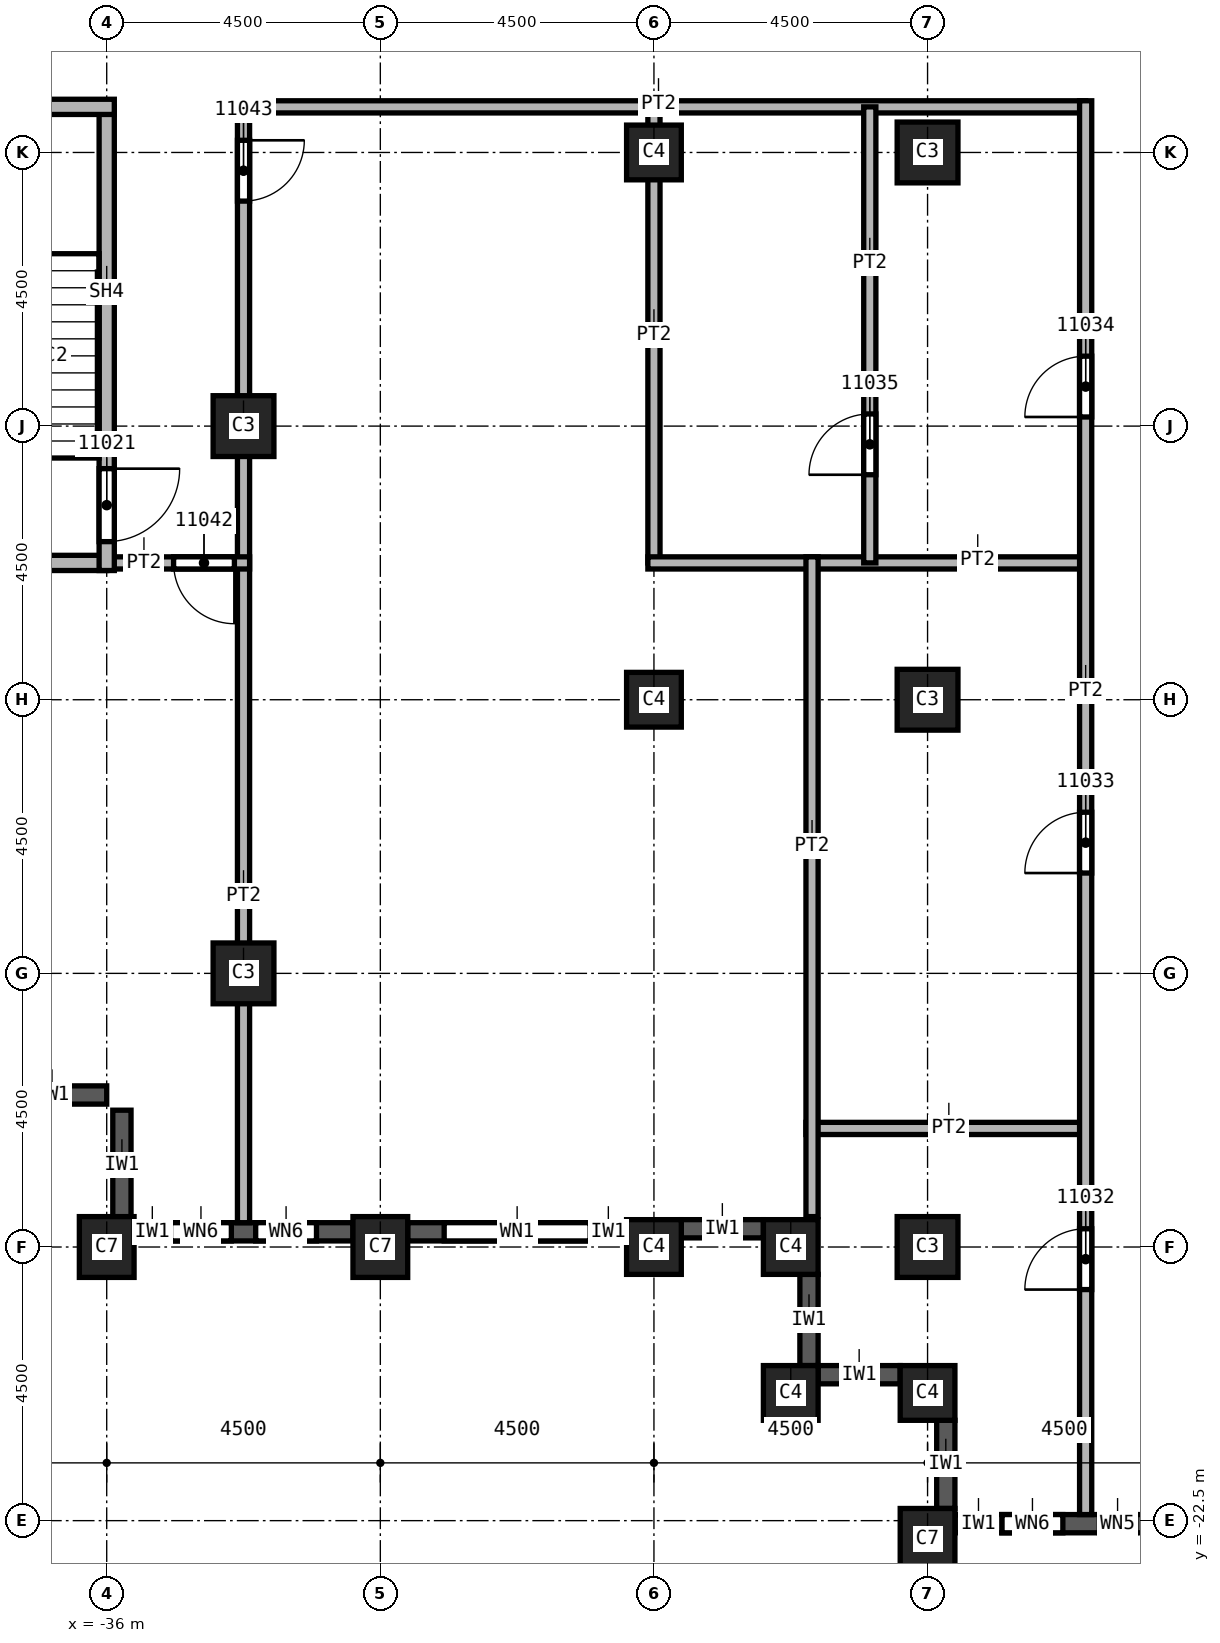
"""IFC4 building model, lengths in metres.
Left out: names, types, materials, properties, quantities, classifications, styles, units other than length and angle.
Written with IfcOpenShell. Run it as: python <this file> out.ifc"""

import sys

from ifc_helpers import new_model, si_unit, direction, frame, frame_2d, origin, origin_2d, place, context, subcontext, project, spatial, rectangle, extrude, element, fill, save


model = new_model("IFC4")
c1 = context("Model", 3, precision=1e-05, world=origin(), true_north=direction((0.0, 1.0)))
c2 = subcontext(c1, "Body", "Model", "MODEL_VIEW")
j1 = project(units=[si_unit("LENGTHUNIT", "METRE"), si_unit("PLANEANGLEUNIT", "RADIAN")], contexts=[c1])
p1 = place(None, origin())
s1 = spatial("IfcSite", under=j1, at=p1, CompositionType="ELEMENT")
p2 = place(p1, origin())
s2 = spatial("IfcBuilding", under=s1, at=p2, CompositionType="ELEMENT")
p3 = place(p2, frame((0.0, 0.0, 184.0)))
s3 = spatial("IfcBuildingStorey", under=s2, at=p3, CompositionType="ELEMENT", Elevation=184.0)
for number, where, z_axis, x_axis in (
    (1, (-31.5, -18.0, 0.0), (0.0, 0.0, 1.0), (1.0, 0.0, 0.0)),
    (2, (-36.0, -18.0, 0.0), (0.0, 0.0, 1.0), (1.0, 0.0, 0.0)),
):
    element("IfcColumn", number, at=place(p3, frame(where, z_axis=z_axis, x_axis=x_axis)), inside=s3, PredefinedType="COLUMN", context=c2, shape_type="SweptSolid", body=[
        extrude(rectangle(XDim=0.9, YDim=1.0, at=origin_2d()), origin(), (0.0, 0.0, 1.0), 3.72),
    ])
for number, where, z_axis, x_axis in (
    (3, (-33.75, -4.5, 0.0), (0.0, 0.0, 1.0), (1.0, 0.0, 0.0)),
    (4, (-33.75, -13.5, 0.0), (0.0, 0.0, 1.0), (1.0, 0.0, 0.0)),
    (5, (-22.5, 0.0, 0.0), (0.0, 0.0, 1.0), (1.0, 0.0, 0.0)),
    (6, (-22.5, -9.0, 0.0), (0.0, 0.0, 1.0), (1.0, 0.0, 0.0)),
    (7, (-22.5, -18.0, 0.0), (0.0, 0.0, 1.0), (1.0, 0.0, 0.0)),
):
    element("IfcColumn", number, at=place(p3, frame(where, z_axis=z_axis, x_axis=x_axis)), inside=s3, PredefinedType="COLUMN", context=c2, shape_type="SweptSolid", body=[
        extrude(rectangle(XDim=1.0, YDim=1.0, at=origin_2d()), origin(), (0.0, 0.0, 1.0), 3.72),
    ])
p4 = place(p3, frame((-22.5, -22.8, 0.0), z_axis=(0.0, 0.0, 1.0), x_axis=(1.0, 0.0, 0.0)))
e8 = element("IfcColumn", 8, at=p4, inside=s3, PredefinedType="COLUMN", context=c2, shape_type="SweptSolid", body=[
    extrude(rectangle(XDim=0.9, YDim=1.0, at=origin_2d()), origin(), (0.0, 0.0, 1.0), 3.72),
])
for number, where, z_axis, x_axis in (
    (9, (-27.0, 0.0, 0.0), (0.0, 0.0, 1.0), (1.0, 0.0, 0.0)),
    (10, (-27.0, -9.0, 0.0), (0.0, 0.0, 1.0), (1.0, 0.0, 0.0)),
    (11, (-27.0, -18.0, 0.0), (0.0, 0.0, 1.0), (1.0, 0.0, 0.0)),
    (12, (-22.5, -20.4, 0.0), (0.0, 0.0, 1.0), (1.0, 0.0, 0.0)),
    (13, (-24.75, -20.4, 0.0), (0.0, 0.0, 1.0), (1.0, 0.0, 0.0)),
    (14, (-24.75, -18.0, 0.0), (0.0, 0.0, 1.0), (1.0, 0.0, 0.0)),
):
    element("IfcColumn", number, at=place(p3, frame(where, z_axis=z_axis, x_axis=x_axis)), inside=s3, PredefinedType="COLUMN", context=c2, shape_type="SweptSolid", body=[
        extrude(rectangle(XDim=0.9, YDim=0.9, at=origin_2d()), origin(), (0.0, 0.0, 1.0), 3.72),
    ])
for number, where, z_axis, x_axis in (
    (15, (-37.8, -15.5, 0.0), (0.0, 0.0, 1.0), (1.0, 0.0, 0.0)),
    (16, (-35.75, -17.55, 0.0), (0.0, 0.0, 1.0), (0.0, 1.0, 0.0)),
):
    element("IfcWall", number, at=place(p3, frame(where, z_axis=z_axis, x_axis=x_axis)), inside=s3, PredefinedType="SOLIDWALL", context=c2, shape_type="SweptSolid", body=[
        extrude(rectangle(XDim=1.8, YDim=0.3, at=frame_2d((0.9, 0.0))), origin(), (0.0, 0.0, 1.0), 3.12),
    ])
p5 = place(p3, frame((-35.55, -17.75, 0.0), z_axis=(0.0, 0.0, 1.0), x_axis=(1.0, 0.0, 0.0)))
e17 = element("IfcWall", 17, at=p5, inside=s3, PredefinedType="SOLIDWALL", context=c2, shape_type="SweptSolid", body=[
    extrude(rectangle(XDim=3.6, YDim=0.3, at=frame_2d((1.8, 0.0))), origin(), (0.0, 0.0, 1.0), 3.12),
])
p6 = place(p5, frame((0.6, 0.0, 0.8)))
e18 = element("IfcOpeningElement", 18, at=p6, cuts=e17, PredefinedType="OPENING", context=c2, shape_type="SweptSolid", body=[
    extrude(rectangle(XDim=1.0, YDim=1.95, at=frame_2d((0.5, 0.975))), frame((0.0, 0.15, 0.0), z_axis=(0.0, -1.0, 0.0), x_axis=(1.0, 0.0, 0.0)), (0.0, 0.0, 1.0), 0.3),
])
p7 = place(p5, frame((2.0, 0.0, 0.8)))
e19 = element("IfcOpeningElement", 19, at=p7, cuts=e17, PredefinedType="OPENING", context=c2, shape_type="SweptSolid", body=[
    extrude(rectangle(XDim=1.0, YDim=1.95, at=frame_2d((0.5, 0.975))), frame((0.0, 0.15, 0.0), z_axis=(0.0, -1.0, 0.0), x_axis=(1.0, 0.0, 0.0)), (0.0, 0.0, 1.0), 0.3),
])
p8 = place(p3, frame((-31.05, -17.75, 0.0), z_axis=(0.0, 0.0, 1.0), x_axis=(1.0, 0.0, 0.0)))
e20 = element("IfcWall", 20, at=p8, inside=s3, PredefinedType="SOLIDWALL", context=c2, shape_type="SweptSolid", body=[
    extrude(rectangle(XDim=3.6, YDim=0.3, at=frame_2d((1.8, 0.0))), origin(), (0.0, 0.0, 1.0), 3.12),
])
p9 = place(p8, frame((0.6, 0.0, 0.8)))
e21 = element("IfcOpeningElement", 21, at=p9, cuts=e20, PredefinedType="OPENING", context=c2, shape_type="SweptSolid", body=[
    extrude(rectangle(XDim=2.4, YDim=1.95, at=frame_2d((1.2, 0.975))), frame((0.0, 0.15, 0.0), z_axis=(0.0, -1.0, 0.0), x_axis=(1.0, 0.0, 0.0)), (0.0, 0.0, 1.0), 0.3),
])
p10 = place(p3, frame((-26.55, -17.7, 0.0), z_axis=(0.0, 0.0, 1.0), x_axis=(1.0, 0.0, 0.0)))
e22 = element("IfcWall", 22, at=p10, inside=s3, PredefinedType="SOLIDWALL", context=c2, shape_type="SweptSolid", body=[
    extrude(rectangle(XDim=1.35, YDim=0.3, at=frame_2d((0.675, 0.0))), origin(), (0.0, 0.0, 1.0), 3.12),
])
p11 = place(p3, frame((-24.45, -18.45, 0.0), z_axis=(0.0, 0.0, 1.0), x_axis=(0.0, -1.0, 0.0)))
e23 = element("IfcWall", 23, at=p11, inside=s3, PredefinedType="SOLIDWALL", context=c2, shape_type="SweptSolid", body=[
    extrude(rectangle(XDim=1.5, YDim=0.3, at=frame_2d((0.75, 0.0))), origin(), (0.0, 0.0, 1.0), 3.12),
])
p12 = place(p3, frame((-24.3, -20.1, 0.0), z_axis=(0.0, 0.0, 1.0), x_axis=(1.0, 0.0, 0.0)))
e24 = element("IfcWall", 24, at=p12, inside=s3, PredefinedType="SOLIDWALL", context=c2, shape_type="SweptSolid", body=[
    extrude(rectangle(XDim=1.35, YDim=0.3, at=frame_2d((0.675, 0.0))), origin(), (0.0, 0.0, 1.0), 3.12),
])
p13 = place(p3, frame((-22.2, -20.85, 0.0), z_axis=(0.0, 0.0, 1.0), x_axis=(0.0, -1.0, 0.0)))
e25 = element("IfcWall", 25, at=p13, inside=s3, PredefinedType="SOLIDWALL", context=c2, shape_type="SweptSolid", body=[
    extrude(rectangle(XDim=1.45, YDim=0.3, at=frame_2d((0.725, 0.0))), origin(), (0.0, 0.0, 1.0), 3.12),
])
p14 = place(p3, frame((-22.05, -22.55, 0.0), z_axis=(0.0, 0.0, 1.0), x_axis=(1.0, 0.0, 0.0)))
e26 = element("IfcWall", 26, at=p14, inside=s3, PredefinedType="SOLIDWALL", context=c2, shape_type="SweptSolid", body=[
    extrude(rectangle(XDim=3.6, YDim=0.3, at=frame_2d((1.8, 0.0))), origin(), (0.0, 0.0, 1.0), 3.12),
])
p15 = place(p14, frame((0.775, 0.0, 0.8)))
e27 = element("IfcOpeningElement", 27, at=p15, cuts=e26, PredefinedType="OPENING", context=c2, shape_type="SweptSolid", body=[
    extrude(rectangle(XDim=1.0, YDim=1.95, at=frame_2d((0.5, 0.975))), frame((0.0, 0.15, 0.0), z_axis=(0.0, -1.0, 0.0), x_axis=(1.0, 0.0, 0.0)), (0.0, 0.0, 1.0), 0.3),
])
p16 = place(p14, frame((2.375, 0.0, 0.8)))
e28 = element("IfcOpeningElement", 28, at=p16, cuts=e26, PredefinedType="OPENING", context=c2, shape_type="SweptSolid", body=[
    extrude(rectangle(XDim=0.6, YDim=1.95, at=frame_2d((0.3, 0.975))), frame((0.0, 0.15, 0.0), z_axis=(0.0, -1.0, 0.0), x_axis=(1.0, 0.0, 0.0)), (0.0, 0.0, 1.0), 0.3),
])
p17 = place(p3, frame((-33.75, 0.75, 0.0), z_axis=(0.0, 0.0, 1.0), x_axis=(0.0, -1.0, 0.0)))
e29 = element("IfcWall", 29, at=p17, inside=s3, PredefinedType="PARTITIONING", context=c2, shape_type="SweptSolid", body=[
    extrude(rectangle(XDim=18.35, YDim=0.2, at=frame_2d((9.175, 0.0))), origin(), (0.0, 0.0, 1.0), 3.72),
])
p18 = place(p17, frame((0.55, 0.0, 0.0)))
e30 = element("IfcOpeningElement", 30, at=p18, cuts=e29, PredefinedType="OPENING", context=c2, shape_type="SweptSolid", body=[
    extrude(rectangle(XDim=1.0, YDim=2.1, at=frame_2d((0.5, 1.05))), frame((0.0, 0.1, 0.0), z_axis=(0.0, -1.0, 0.0), x_axis=(1.0, 0.0, 0.0)), (0.0, 0.0, 1.0), 0.2),
])
p19 = place(p3, frame((-33.65, -6.75, 0.0), z_axis=(0.0, 0.0, 1.0), x_axis=(-1.0, 0.0, 0.0)))
e31 = element("IfcWall", 31, at=p19, inside=s3, PredefinedType="PARTITIONING", context=c2, shape_type="SweptSolid", body=[
    extrude(rectangle(XDim=2.35, YDim=0.2, at=frame_2d((1.175, 0.0))), origin(), (0.0, 0.0, 1.0), 3.72),
])
p20 = place(p19, frame((0.25, 0.0, 0.0)))
e32 = element("IfcOpeningElement", 32, at=p20, cuts=e31, PredefinedType="OPENING", context=c2, shape_type="SweptSolid", body=[
    extrude(rectangle(XDim=1.0, YDim=2.1, at=frame_2d((0.5, 1.05))), frame((0.0, 0.1, 0.0), z_axis=(0.0, -1.0, 0.0), x_axis=(1.0, 0.0, 0.0)), (0.0, 0.0, 1.0), 0.2),
])
p21 = place(p3, frame((-27.0, -6.75, 0.0), z_axis=(0.0, 0.0, 1.0), x_axis=(0.0, 1.0, 0.0)))
e33 = element("IfcWall", 33, at=p21, inside=s3, PredefinedType="PARTITIONING", context=c2, shape_type="SweptSolid", body=[
    extrude(rectangle(XDim=7.5, YDim=0.2, at=frame_2d((3.75, 0.0))), origin(), (0.0, 0.0, 1.0), 3.72),
])
p22 = place(p3, frame((-19.9, 0.75, 0.0), z_axis=(0.0, 0.0, 1.0), x_axis=(-1.0, 0.0, 0.0)))
e34 = element("IfcWall", 34, at=p22, inside=s3, PredefinedType="PARTITIONING", context=c2, shape_type="SweptSolid", body=[
    extrude(rectangle(XDim=13.95, YDim=0.2, at=frame_2d((6.975, 0.0))), origin(), (0.0, 0.0, 1.0), 3.72),
])
p23 = place(p3, frame((-24.5, -16.05, 0.0), z_axis=(0.0, 0.0, 1.0), x_axis=(1.0, 0.0, 0.0)))
e35 = element("IfcWall", 35, at=p23, inside=s3, PredefinedType="PARTITIONING", context=c2, shape_type="SweptSolid", body=[
    extrude(rectangle(XDim=4.6, YDim=0.2, at=frame_2d((2.3, 0.0))), origin(), (0.0, 0.0, 1.0), 3.72),
])
p24 = place(p3, frame((-27.1, -6.75, 0.0), z_axis=(0.0, 0.0, 1.0), x_axis=(1.0, 0.0, 0.0)))
e36 = element("IfcWall", 36, at=p24, inside=s3, PredefinedType="PARTITIONING", context=c2, shape_type="SweptSolid", body=[
    extrude(rectangle(XDim=7.2, YDim=0.2, at=frame_2d((3.6, 0.0))), origin(), (0.0, 0.0, 1.0), 3.72),
])
p25 = place(p3, frame((-24.4, -17.5, 0.0), z_axis=(0.0, 0.0, 1.0), x_axis=(0.0, 1.0, 0.0)))
e37 = element("IfcWall", 37, at=p25, inside=s3, PredefinedType="PARTITIONING", context=c2, shape_type="SweptSolid", body=[
    extrude(rectangle(XDim=10.85, YDim=0.2, at=frame_2d((5.425, 0.0))), origin(), (0.0, 0.0, 1.0), 3.72),
])
p26 = place(p3, frame((-23.45, -6.75, 0.0), z_axis=(0.0, 0.0, 1.0), x_axis=(0.0, 1.0, 0.0)))
e38 = element("IfcWall", 38, at=p26, inside=s3, PredefinedType="PARTITIONING", context=c2, shape_type="SweptSolid", body=[
    extrude(rectangle(XDim=7.5, YDim=0.2, at=frame_2d((3.75, 0.0))), origin(), (0.0, 0.0, 1.0), 3.72),
])
p27 = place(p26, frame((1.45, 0.0, 0.0)))
e39 = element("IfcOpeningElement", 39, at=p27, cuts=e38, PredefinedType="OPENING", context=c2, shape_type="SweptSolid", body=[
    extrude(rectangle(XDim=1.0, YDim=2.1, at=frame_2d((0.5, 1.05))), frame((0.0, 0.1, 0.0), z_axis=(0.0, -1.0, 0.0), x_axis=(1.0, 0.0, 0.0)), (0.0, 0.0, 1.0), 0.2),
])
p28 = place(p3, frame((-19.9, -22.4, 0.0), z_axis=(0.0, 0.0, 1.0), x_axis=(0.0, 1.0, 0.0)))
e40 = element("IfcWall", 40, at=p28, inside=s3, PredefinedType="PARTITIONING", context=c2, shape_type="SweptSolid", body=[
    extrude(rectangle(XDim=23.25, YDim=0.2, at=frame_2d((11.625, 0.0))), origin(), (0.0, 0.0, 1.0), 3.72),
])
p29 = place(p28, frame((3.7, 0.0, 0.0)))
e41 = element("IfcOpeningElement", 41, at=p29, cuts=e40, PredefinedType="OPENING", context=c2, shape_type="SweptSolid", body=[
    extrude(rectangle(XDim=1.0, YDim=2.1, at=frame_2d((0.5, 1.05))), frame((0.0, 0.1, 0.0), z_axis=(0.0, -1.0, 0.0), x_axis=(1.0, 0.0, 0.0)), (0.0, 0.0, 1.0), 0.2),
])
p30 = place(p28, frame((10.55, 0.0, 0.0)))
e42 = element("IfcOpeningElement", 42, at=p30, cuts=e40, PredefinedType="OPENING", context=c2, shape_type="SweptSolid", body=[
    extrude(rectangle(XDim=1.0, YDim=2.1, at=frame_2d((0.5, 1.05))), frame((0.0, 0.1, 0.0), z_axis=(0.0, -1.0, 0.0), x_axis=(1.0, 0.0, 0.0)), (0.0, 0.0, 1.0), 0.2),
])
p31 = place(p28, frame((18.05, 0.0, 0.0)))
e43 = element("IfcOpeningElement", 43, at=p31, cuts=e40, PredefinedType="OPENING", context=c2, shape_type="SweptSolid", body=[
    extrude(rectangle(XDim=1.0, YDim=2.1, at=frame_2d((0.5, 1.05))), frame((0.0, 0.1, 0.0), z_axis=(0.0, -1.0, 0.0), x_axis=(1.0, 0.0, 0.0)), (0.0, 0.0, 1.0), 0.2),
])
p32 = place(p3, frame((-36.0, -6.75, 0.0), z_axis=(0.0, 0.0, 1.0), x_axis=(-1.0, 0.0, 0.0)))
e44 = element("IfcWall", 44, at=p32, inside=s3, PredefinedType="SOLIDWALL", context=c2, shape_type="SweptSolid", body=[
    extrude(rectangle(XDim=4.1, YDim=0.25, at=frame_2d((2.05, 0.0))), origin(), (0.0, 0.0, 1.0), 3.72),
])
p33 = place(p3, frame((-36.0, 0.75, 0.0), z_axis=(0.0, 0.0, 1.0), x_axis=(0.0, -1.0, 0.0)))
e45 = element("IfcWall", 45, at=p33, inside=s3, PredefinedType="SOLIDWALL", context=c2, shape_type="SweptSolid", body=[
    extrude(rectangle(XDim=7.625, YDim=0.25, at=frame_2d((3.812, 0.0))), origin(), (0.0, 0.0, 1.0), 3.72),
])
p34 = place(p33, frame((5.95, 0.0, 0.0)))
e46 = element("IfcOpeningElement", 46, at=p34, cuts=e45, PredefinedType="OPENING", context=c2, shape_type="SweptSolid", body=[
    extrude(rectangle(XDim=1.2, YDim=2.1, at=frame_2d((0.6, 1.05))), frame((0.0, 0.125, 0.0), z_axis=(0.0, -1.0, 0.0), x_axis=(1.0, 0.0, 0.0)), (0.0, 0.0, 1.0), 0.25),
])
p35 = place(p3, frame((-35.875, 0.75, 0.0), z_axis=(0.0, 0.0, 1.0), x_axis=(-1.0, 0.0, 0.0)))
e47 = element("IfcWall", 47, at=p35, inside=s3, PredefinedType="SOLIDWALL", context=c2, shape_type="SweptSolid", body=[
    extrude(rectangle(XDim=4.225, YDim=0.25, at=frame_2d((2.113, 0.0))), origin(), (0.0, 0.0, 1.0), 3.72),
])
p36 = place(p9, origin())
e48 = element("IfcWindow", 48, at=p36, inside=s3, PartitioningType="SINGLE_PANEL", PredefinedType="WINDOW", context=c2, shape_type="SweptSolid", body=[
    extrude(rectangle(XDim=2.4, YDim=1.95, at=frame_2d((1.2, 0.975))), frame((0.0, 0.03, 0.0), z_axis=(0.0, -1.0, 0.0), x_axis=(1.0, 0.0, 0.0)), (0.0, 0.0, 1.0), 0.06),
])
fill(e21, e48)
p37 = place(p34, origin())
e49 = element("IfcDoor", 49, at=p37, inside=s3, OperationType="SINGLE_SWING_RIGHT", PredefinedType="DOOR", context=c2, shape_type="SweptSolid", body=[
    extrude(rectangle(XDim=1.2, YDim=2.1, at=frame_2d((0.6, 1.05))), frame((0.0, 0.025, 0.0), z_axis=(0.0, -1.0, 0.0), x_axis=(1.0, 0.0, 0.0)), (0.0, 0.0, 1.0), 0.05),
])
fill(e46, e49)
p38 = place(p29, origin())
e50 = element("IfcDoor", 50, at=p38, inside=s3, OperationType="SINGLE_SWING_LEFT", PredefinedType="DOOR", context=c2, shape_type="SweptSolid", body=[
    extrude(rectangle(XDim=1.0, YDim=2.1, at=frame_2d((0.5, 1.05))), frame((0.0, 0.025, 0.0), z_axis=(0.0, -1.0, 0.0), x_axis=(1.0, 0.0, 0.0)), (0.0, 0.0, 1.0), 0.05),
])
fill(e41, e50)
p39 = place(p30, origin())
e51 = element("IfcDoor", 51, at=p39, inside=s3, OperationType="SINGLE_SWING_RIGHT", PredefinedType="DOOR", context=c2, shape_type="SweptSolid", body=[
    extrude(rectangle(XDim=1.0, YDim=2.1, at=frame_2d((0.5, 1.05))), frame((0.0, 0.025, 0.0), z_axis=(0.0, -1.0, 0.0), x_axis=(1.0, 0.0, 0.0)), (0.0, 0.0, 1.0), 0.05),
])
fill(e42, e51)
p40 = place(p31, origin())
e52 = element("IfcDoor", 52, at=p40, inside=s3, OperationType="SINGLE_SWING_LEFT", PredefinedType="DOOR", context=c2, shape_type="SweptSolid", body=[
    extrude(rectangle(XDim=1.0, YDim=2.1, at=frame_2d((0.5, 1.05))), frame((0.0, 0.025, 0.0), z_axis=(0.0, -1.0, 0.0), x_axis=(1.0, 0.0, 0.0)), (0.0, 0.0, 1.0), 0.05),
])
fill(e43, e52)
p41 = place(p27, origin())
e53 = element("IfcDoor", 53, at=p41, inside=s3, OperationType="SINGLE_SWING_RIGHT", PredefinedType="DOOR", context=c2, shape_type="SweptSolid", body=[
    extrude(rectangle(XDim=1.0, YDim=2.1, at=frame_2d((0.5, 1.05))), frame((0.0, 0.025, 0.0), z_axis=(0.0, -1.0, 0.0), x_axis=(1.0, 0.0, 0.0)), (0.0, 0.0, 1.0), 0.05),
])
fill(e39, e53)
p42 = place(p20, origin())
e54 = element("IfcDoor", 54, at=p42, inside=s3, OperationType="SINGLE_SWING_LEFT", PredefinedType="DOOR", context=c2, shape_type="SweptSolid", body=[
    extrude(rectangle(XDim=1.0, YDim=2.1, at=frame_2d((0.5, 1.05))), frame((0.0, 0.025, 0.0), z_axis=(0.0, -1.0, 0.0), x_axis=(1.0, 0.0, 0.0)), (0.0, 0.0, 1.0), 0.05),
])
fill(e32, e54)
p43 = place(p18, origin())
e55 = element("IfcDoor", 55, at=p43, inside=s3, OperationType="SINGLE_SWING_RIGHT", PredefinedType="DOOR", context=c2, shape_type="SweptSolid", body=[
    extrude(rectangle(XDim=1.0, YDim=2.1, at=frame_2d((0.5, 1.05))), frame((0.0, 0.025, 0.0), z_axis=(0.0, -1.0, 0.0), x_axis=(1.0, 0.0, 0.0)), (0.0, 0.0, 1.0), 0.05),
])
fill(e30, e55)
p44 = place(p6, origin())
e56 = element("IfcWindow", 56, at=p44, inside=s3, PartitioningType="SINGLE_PANEL", PredefinedType="WINDOW", context=c2, shape_type="SweptSolid", body=[
    extrude(rectangle(XDim=1.0, YDim=1.95, at=frame_2d((0.5, 0.975))), frame((0.0, 0.03, 0.0), z_axis=(0.0, -1.0, 0.0), x_axis=(1.0, 0.0, 0.0)), (0.0, 0.0, 1.0), 0.06),
])
fill(e18, e56)
p45 = place(p7, origin())
e57 = element("IfcWindow", 57, at=p45, inside=s3, PartitioningType="SINGLE_PANEL", PredefinedType="WINDOW", context=c2, shape_type="SweptSolid", body=[
    extrude(rectangle(XDim=1.0, YDim=1.95, at=frame_2d((0.5, 0.975))), frame((0.0, 0.03, 0.0), z_axis=(0.0, -1.0, 0.0), x_axis=(1.0, 0.0, 0.0)), (0.0, 0.0, 1.0), 0.06),
])
fill(e19, e57)
p46 = place(p15, origin())
e58 = element("IfcWindow", 58, at=p46, inside=s3, PartitioningType="SINGLE_PANEL", PredefinedType="WINDOW", context=c2, shape_type="SweptSolid", body=[
    extrude(rectangle(XDim=1.0, YDim=1.95, at=frame_2d((0.5, 0.975))), frame((0.0, 0.03, 0.0), z_axis=(0.0, -1.0, 0.0), x_axis=(1.0, 0.0, 0.0)), (0.0, 0.0, 1.0), 0.06),
])
fill(e27, e58)
p47 = place(p16, origin())
e59 = element("IfcWindow", 59, at=p47, inside=s3, PartitioningType="SINGLE_PANEL", PredefinedType="WINDOW", context=c2, shape_type="SweptSolid", body=[
    extrude(rectangle(XDim=0.6, YDim=1.95, at=frame_2d((0.3, 0.975))), frame((0.0, 0.03, 0.0), z_axis=(0.0, -1.0, 0.0), x_axis=(1.0, 0.0, 0.0)), (0.0, 0.0, 1.0), 0.06),
])
fill(e28, e59)
save(model, sys.argv[1])
